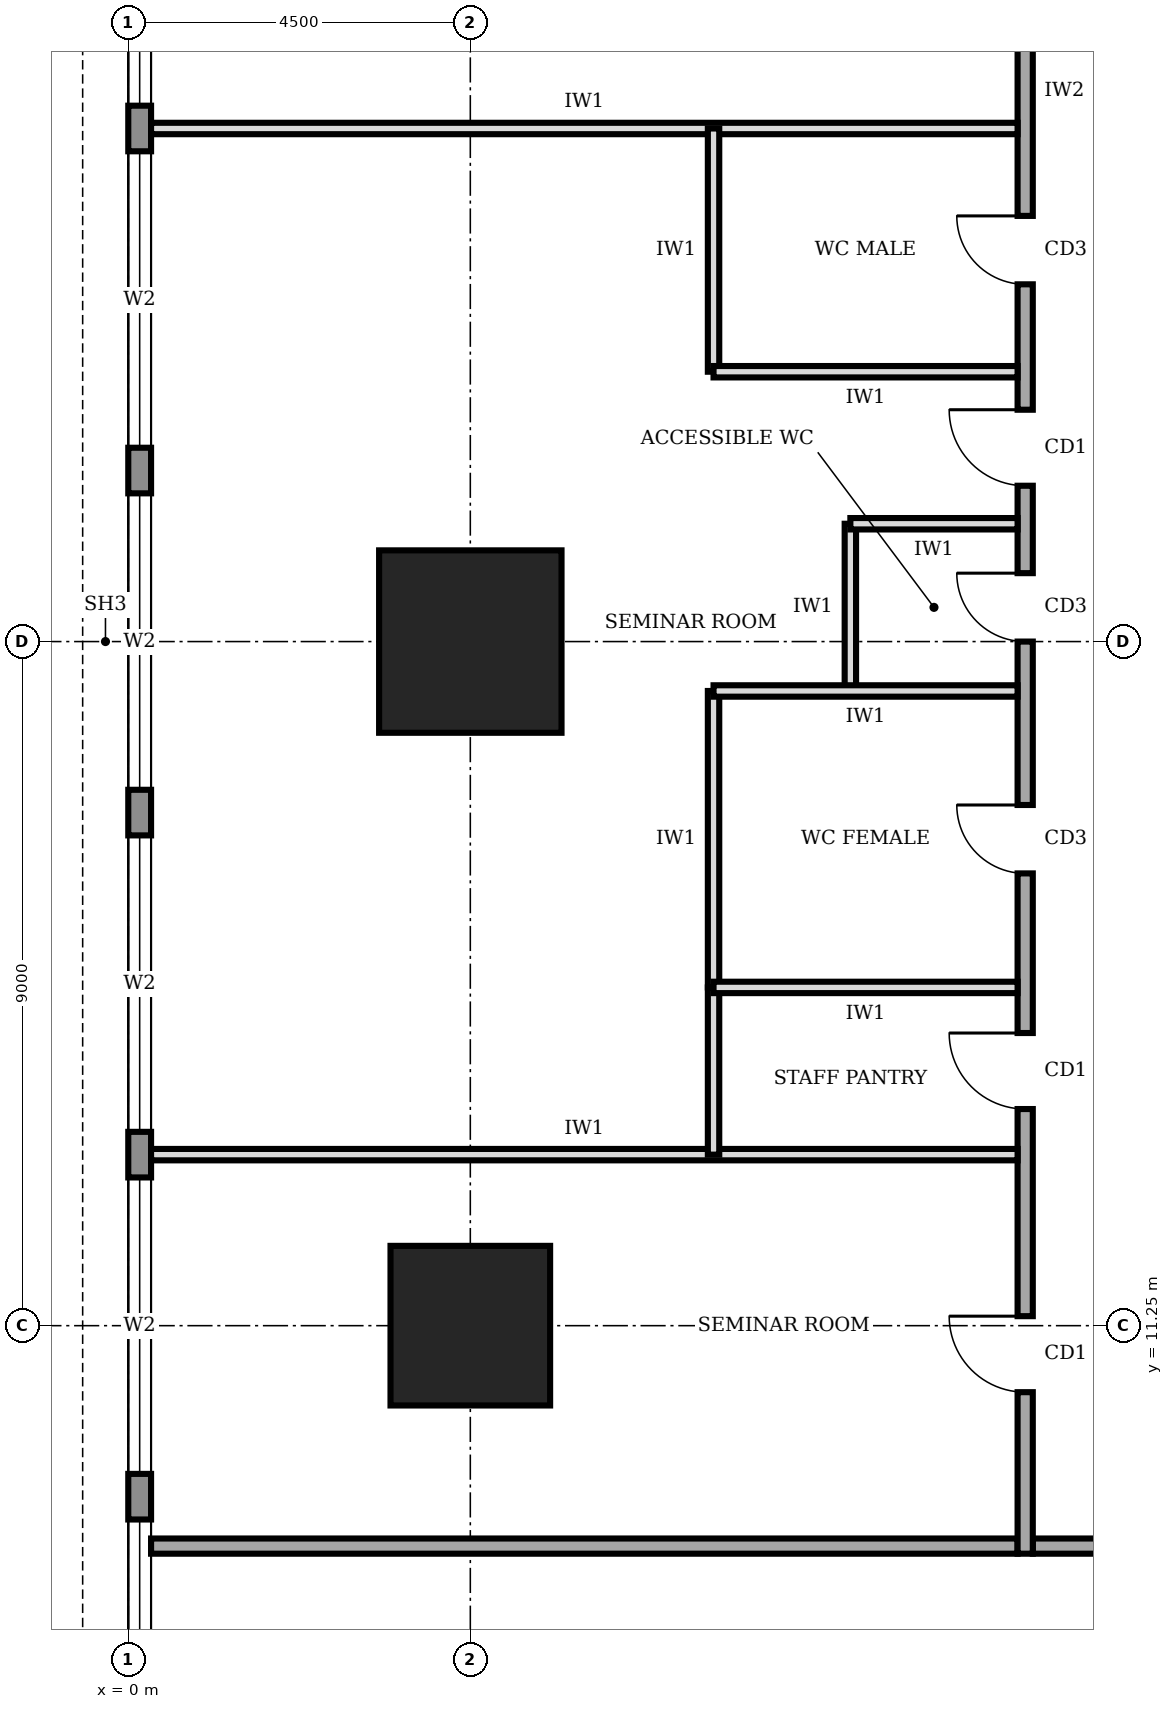
"""IFC4 building model, lengths in metres.
Left out: names, types, materials, properties, quantities, classifications, styles, units other than length and angle.
Written with IfcOpenShell. Run it as: python <this file> out.ifc"""

import sys

from ifc_helpers import new_model, si_unit, direction, frame, frame_2d, origin, origin_2d, place, context, subcontext, project, spatial, rectangle, extrude, element, fill, save


model = new_model("IFC4")
c1 = context("Model", 3, precision=1e-05, world=origin(), true_north=direction((0.0, 1.0)))
c2 = subcontext(c1, "Body", "Model", "MODEL_VIEW")
j1 = project(units=[si_unit("LENGTHUNIT", "METRE"), si_unit("PLANEANGLEUNIT", "RADIAN")], contexts=[c1])
p1 = place(None, origin())
s1 = spatial("IfcSite", under=j1, at=p1, CompositionType="ELEMENT")
p2 = place(p1, origin())
s2 = spatial("IfcBuilding", under=s1, at=p2, CompositionType="ELEMENT")
p3 = place(p2, frame((0.0, 0.0, 161.0)))
s3 = spatial("IfcBuildingStorey", under=s2, at=p3, CompositionType="ELEMENT", Elevation=161.0)
p4 = place(p3, frame((4.5, 11.25, 0.0), z_axis=(0.0, 0.0, 1.0), x_axis=(1.0, 0.0, 0.0)))
e1 = element("IfcColumn", 1, at=p4, inside=s3, PredefinedType="COLUMN", context=c2, shape_type="SweptSolid", body=[
    extrude(rectangle(XDim=2.1, YDim=2.1, at=origin_2d()), origin(), (0.0, 0.0, 1.0), 4.0),
])
p5 = place(p3, frame((4.5, 20.25, 0.0), z_axis=(0.0, 0.0, 1.0), x_axis=(1.0, 0.0, 0.0)))
e2 = element("IfcColumn", 2, at=p5, inside=s3, PredefinedType="COLUMN", context=c2, shape_type="SweptSolid", body=[
    extrude(rectangle(XDim=2.4, YDim=2.4, at=origin_2d()), origin(), (0.0, 0.0, 1.0), 4.0),
])
p6 = place(p3, frame((0.15, 35.98, 0.0), z_axis=(0.0, 0.0, 1.0), x_axis=(0.0, -1.0, 0.0)))
e3 = element("IfcWall", 3, at=p6, inside=s3, PredefinedType="STANDARD", context=c2, shape_type="SweptSolid", body=[
    extrude(rectangle(XDim=31.46, YDim=0.3, at=frame_2d((15.73, 0.0))), origin(), (0.0, 0.0, 1.0), 3.75),
])
p7 = place(p6, frame((27.28, 0.0, 0.6)))
e4 = element("IfcOpeningElement", 4, at=p7, cuts=e3, PredefinedType="OPENING", context=c2, shape_type="SweptSolid", body=[
    extrude(rectangle(XDim=3.9, YDim=2.6, at=frame_2d((1.95, 1.3))), frame((0.0, 0.16, 0.0), z_axis=(0.0, -1.0, 0.0), x_axis=(1.0, 0.0, 0.0)), (0.0, 0.0, 1.0), 0.32),
])
p8 = place(p6, frame((22.78, 0.0, 0.6)))
e5 = element("IfcOpeningElement", 5, at=p8, cuts=e3, PredefinedType="OPENING", context=c2, shape_type="SweptSolid", body=[
    extrude(rectangle(XDim=3.9, YDim=2.6, at=frame_2d((1.95, 1.3))), frame((0.0, 0.16, 0.0), z_axis=(0.0, -1.0, 0.0), x_axis=(1.0, 0.0, 0.0)), (0.0, 0.0, 1.0), 0.32),
])
p9 = place(p6, frame((18.28, 0.0, 0.6)))
e6 = element("IfcOpeningElement", 6, at=p9, cuts=e3, PredefinedType="OPENING", context=c2, shape_type="SweptSolid", body=[
    extrude(rectangle(XDim=3.9, YDim=2.6, at=frame_2d((1.95, 1.3))), frame((0.0, 0.16, 0.0), z_axis=(0.0, -1.0, 0.0), x_axis=(1.0, 0.0, 0.0)), (0.0, 0.0, 1.0), 0.32),
])
p10 = place(p6, frame((13.78, 0.0, 0.6)))
e7 = element("IfcOpeningElement", 7, at=p10, cuts=e3, PredefinedType="OPENING", context=c2, shape_type="SweptSolid", body=[
    extrude(rectangle(XDim=3.9, YDim=2.6, at=frame_2d((1.95, 1.3))), frame((0.0, 0.16, 0.0), z_axis=(0.0, -1.0, 0.0), x_axis=(1.0, 0.0, 0.0)), (0.0, 0.0, 1.0), 0.32),
])
p11 = place(p6, frame((9.28, 0.0, 0.6)))
e8 = element("IfcOpeningElement", 8, at=p11, cuts=e3, PredefinedType="OPENING", context=c2, shape_type="SweptSolid", body=[
    extrude(rectangle(XDim=3.9, YDim=2.6, at=frame_2d((1.95, 1.3))), frame((0.0, 0.16, 0.0), z_axis=(0.0, -1.0, 0.0), x_axis=(1.0, 0.0, 0.0)), (0.0, 0.0, 1.0), 0.32),
])
p12 = place(p6, frame((4.78, 0.0, 0.6)))
e9 = element("IfcOpeningElement", 9, at=p12, cuts=e3, PredefinedType="OPENING", context=c2, shape_type="SweptSolid", body=[
    extrude(rectangle(XDim=3.9, YDim=2.6, at=frame_2d((1.95, 1.3))), frame((0.0, 0.16, 0.0), z_axis=(0.0, -1.0, 0.0), x_axis=(1.0, 0.0, 0.0)), (0.0, 0.0, 1.0), 0.32),
])
p13 = place(p3, frame((11.9, 8.35, 0.0), z_axis=(0.0, 0.0, 1.0), x_axis=(1.0, 0.0, 0.0)))
e10 = element("IfcWall", 10, at=p13, inside=s3, PredefinedType="SOLIDWALL", context=c2, shape_type="SweptSolid", body=[
    extrude(rectangle(XDim=28.3, YDim=0.2, at=frame_2d((14.15, 0.0))), origin(), (0.0, 0.0, 1.0), 3.75),
])
p14 = place(p13, frame((6.55, 0.0, 0.0)))
e11 = element("IfcOpeningElement", 11, at=p14, cuts=e10, PredefinedType="OPENING", context=c2, shape_type="SweptSolid", body=[
    extrude(rectangle(XDim=1.8, YDim=2.1, at=frame_2d((0.9, 1.05))), frame((0.0, 0.11, 0.0), z_axis=(0.0, -1.0, 0.0), x_axis=(1.0, 0.0, 0.0)), (0.0, 0.0, 1.0), 0.22),
])
p15 = place(p13, frame((21.3, 0.0, 0.0)))
e12 = element("IfcOpeningElement", 12, at=p15, cuts=e10, PredefinedType="OPENING", context=c2, shape_type="SweptSolid", body=[
    extrude(rectangle(XDim=1.0, YDim=2.1, at=frame_2d((0.5, 1.05))), frame((0.0, 0.11, 0.0), z_axis=(0.0, -1.0, 0.0), x_axis=(1.0, 0.0, 0.0)), (0.0, 0.0, 1.0), 0.22),
])
p16 = place(p3, frame((11.8, 32.05, 0.0), z_axis=(0.0, 0.0, 1.0), x_axis=(0.0, -1.0, 0.0)))
e13 = element("IfcWall", 13, at=p16, inside=s3, PredefinedType="SOLIDWALL", context=c2, shape_type="SweptSolid", body=[
    extrude(rectangle(XDim=23.8, YDim=0.2, at=frame_2d((11.9, 0.0))), origin(), (0.0, 0.0, 1.0), 3.75),
])
p17 = place(p16, frame((20.675, 0.0, 0.0)))
e14 = element("IfcOpeningElement", 14, at=p17, cuts=e13, PredefinedType="OPENING", context=c2, shape_type="SweptSolid", body=[
    extrude(rectangle(XDim=1.0, YDim=2.1, at=frame_2d((0.5, 1.05))), frame((0.0, 0.11, 0.0), z_axis=(0.0, -1.0, 0.0), x_axis=(1.0, 0.0, 0.0)), (0.0, 0.0, 1.0), 0.22),
])
p18 = place(p16, frame((16.95, 0.0, 0.0)))
e15 = element("IfcOpeningElement", 15, at=p18, cuts=e13, PredefinedType="OPENING", context=c2, shape_type="SweptSolid", body=[
    extrude(rectangle(XDim=1.0, YDim=2.1, at=frame_2d((0.5, 1.05))), frame((0.0, 0.11, 0.0), z_axis=(0.0, -1.0, 0.0), x_axis=(1.0, 0.0, 0.0)), (0.0, 0.0, 1.0), 0.22),
])
p19 = place(p16, frame((13.95, 0.0, 0.0)))
e16 = element("IfcOpeningElement", 16, at=p19, cuts=e13, PredefinedType="OPENING", context=c2, shape_type="SweptSolid", body=[
    extrude(rectangle(XDim=0.9, YDim=2.1, at=frame_2d((0.45, 1.05))), frame((0.0, 0.11, 0.0), z_axis=(0.0, -1.0, 0.0), x_axis=(1.0, 0.0, 0.0)), (0.0, 0.0, 1.0), 0.22),
])
p20 = place(p16, frame((10.9, 0.0, 0.0)))
e17 = element("IfcOpeningElement", 17, at=p20, cuts=e13, PredefinedType="OPENING", context=c2, shape_type="SweptSolid", body=[
    extrude(rectangle(XDim=0.9, YDim=2.1, at=frame_2d((0.45, 1.05))), frame((0.0, 0.11, 0.0), z_axis=(0.0, -1.0, 0.0), x_axis=(1.0, 0.0, 0.0)), (0.0, 0.0, 1.0), 0.22),
])
p21 = place(p16, frame((6.2, 0.0, 0.0)))
e18 = element("IfcOpeningElement", 18, at=p21, cuts=e13, PredefinedType="OPENING", context=c2, shape_type="SweptSolid", body=[
    extrude(rectangle(XDim=0.9, YDim=2.1, at=frame_2d((0.45, 1.05))), frame((0.0, 0.11, 0.0), z_axis=(0.0, -1.0, 0.0), x_axis=(1.0, 0.0, 0.0)), (0.0, 0.0, 1.0), 0.22),
])
p22 = place(p16, frame((8.75, 0.0, 0.0)))
e19 = element("IfcOpeningElement", 19, at=p22, cuts=e13, PredefinedType="OPENING", context=c2, shape_type="SweptSolid", body=[
    extrude(rectangle(XDim=1.0, YDim=2.1, at=frame_2d((0.5, 1.05))), frame((0.0, 0.11, 0.0), z_axis=(0.0, -1.0, 0.0), x_axis=(1.0, 0.0, 0.0)), (0.0, 0.0, 1.0), 0.22),
])
p23 = place(p16, frame((1.925, 0.0, 0.0)))
e20 = element("IfcOpeningElement", 20, at=p23, cuts=e13, PredefinedType="OPENING", context=c2, shape_type="SweptSolid", body=[
    extrude(rectangle(XDim=1.0, YDim=2.1, at=frame_2d((0.5, 1.05))), frame((0.0, 0.11, 0.0), z_axis=(0.0, -1.0, 0.0), x_axis=(1.0, 0.0, 0.0)), (0.0, 0.0, 1.0), 0.22),
])
p24 = place(p3, frame((0.3, 8.35, 0.0), z_axis=(0.0, 0.0, 1.0), x_axis=(1.0, 0.0, 0.0)))
e21 = element("IfcWall", 21, at=p24, inside=s3, PredefinedType="SOLIDWALL", context=c2, shape_type="SweptSolid", body=[
    extrude(rectangle(XDim=11.4, YDim=0.2, at=frame_2d((5.7, 0.0))), origin(), (0.0, 0.0, 1.0), 3.75),
])
for number, where, z_axis, x_axis in (
    (22, (0.3, 13.5, 0.0), (0.0, 0.0, 1.0), (1.0, 0.0, 0.0)),
    (23, (0.3, 27.0, 0.0), (0.0, 0.0, 1.0), (1.0, 0.0, 0.0)),
):
    element("IfcWall", number, at=place(p3, frame(where, z_axis=z_axis, x_axis=x_axis)), inside=s3, PredefinedType="PARTITIONING", context=c2, shape_type="SweptSolid", body=[
        extrude(rectangle(XDim=11.4, YDim=0.15, at=frame_2d((5.7, 0.0))), origin(), (0.0, 0.0, 1.0), 3.75),
    ])
p25 = place(p3, frame((11.7, 15.7, 0.0), z_axis=(0.0, 0.0, 1.0), x_axis=(-1.0, 0.0, 0.0)))
e24 = element("IfcWall", 24, at=p25, inside=s3, PredefinedType="PARTITIONING", context=c2, shape_type="SweptSolid", body=[
    extrude(rectangle(XDim=4.0, YDim=0.15, at=frame_2d((2.0, 0.0))), origin(), (0.0, 0.0, 1.0), 3.75),
])
p26 = place(p3, frame((11.7, 19.6, 0.0), z_axis=(0.0, 0.0, 1.0), x_axis=(-1.0, 0.0, 0.0)))
e25 = element("IfcWall", 25, at=p26, inside=s3, PredefinedType="PARTITIONING", context=c2, shape_type="SweptSolid", body=[
    extrude(rectangle(XDim=4.0, YDim=0.15, at=frame_2d((2.0, 0.0))), origin(), (0.0, 0.0, 1.0), 2.85),
])
p27 = place(p3, frame((11.7, 21.8, 0.0), z_axis=(0.0, 0.0, 1.0), x_axis=(-1.0, 0.0, 0.0)))
e26 = element("IfcWall", 26, at=p27, inside=s3, PredefinedType="PARTITIONING", context=c2, shape_type="SweptSolid", body=[
    extrude(rectangle(XDim=2.2, YDim=0.15, at=frame_2d((1.1, 0.0))), origin(), (0.0, 0.0, 1.0), 3.75),
])
p28 = place(p3, frame((11.7, 23.8, 0.0), z_axis=(0.0, 0.0, 1.0), x_axis=(-1.0, 0.0, 0.0)))
e27 = element("IfcWall", 27, at=p28, inside=s3, PredefinedType="PARTITIONING", context=c2, shape_type="SweptSolid", body=[
    extrude(rectangle(XDim=4.0, YDim=0.15, at=frame_2d((2.0, 0.0))), origin(), (0.0, 0.0, 1.0), 3.75),
])
p29 = place(p3, frame((7.7, 13.5, 0.0), z_axis=(0.0, 0.0, 1.0), x_axis=(0.0, 1.0, 0.0)))
e28 = element("IfcWall", 28, at=p29, inside=s3, PredefinedType="PARTITIONING", context=c2, shape_type="SweptSolid", body=[
    extrude(rectangle(XDim=2.2, YDim=0.15, at=frame_2d((1.1, 0.0))), origin(), (0.0, 0.0, 1.0), 3.75),
])
p30 = place(p3, frame((7.7, 15.7, 0.0), z_axis=(0.0, 0.0, 1.0), x_axis=(0.0, 1.0, 0.0)))
e29 = element("IfcWall", 29, at=p30, inside=s3, PredefinedType="PARTITIONING", context=c2, shape_type="SweptSolid", body=[
    extrude(rectangle(XDim=3.9, YDim=0.15, at=frame_2d((1.95, 0.0))), origin(), (0.0, 0.0, 1.0), 3.75),
])
p31 = place(p3, frame((9.5, 19.6, 0.0), z_axis=(0.0, 0.0, 1.0), x_axis=(0.0, 1.0, 0.0)))
e30 = element("IfcWall", 30, at=p31, inside=s3, PredefinedType="PARTITIONING", context=c2, shape_type="SweptSolid", body=[
    extrude(rectangle(XDim=2.2, YDim=0.15, at=frame_2d((1.1, 0.0))), origin(), (0.0, 0.0, 1.0), 3.75),
])
p32 = place(p3, frame((7.7, 23.8, 0.0), z_axis=(0.0, 0.0, 1.0), x_axis=(0.0, 1.0, 0.0)))
e31 = element("IfcWall", 31, at=p32, inside=s3, PredefinedType="PARTITIONING", context=c2, shape_type="SweptSolid", body=[
    extrude(rectangle(XDim=3.2, YDim=0.15, at=frame_2d((1.6, 0.0))), origin(), (0.0, 0.0, 1.0), 3.75),
])
p33 = place(p7, origin())
e32 = element("IfcWindow", 32, at=p33, inside=s3, PartitioningType="SINGLE_PANEL", PredefinedType="WINDOW", context=c2, shape_type="SweptSolid", body=[
    extrude(rectangle(XDim=3.9, YDim=2.6, at=frame_2d((1.95, 1.3))), frame((0.0, 0.03, 0.0), z_axis=(0.0, -1.0, 0.0), x_axis=(1.0, 0.0, 0.0)), (0.0, 0.0, 1.0), 0.06),
])
fill(e4, e32)
p34 = place(p8, origin())
e33 = element("IfcWindow", 33, at=p34, inside=s3, PartitioningType="SINGLE_PANEL", PredefinedType="WINDOW", context=c2, shape_type="SweptSolid", body=[
    extrude(rectangle(XDim=3.9, YDim=2.6, at=frame_2d((1.95, 1.3))), frame((0.0, 0.03, 0.0), z_axis=(0.0, -1.0, 0.0), x_axis=(1.0, 0.0, 0.0)), (0.0, 0.0, 1.0), 0.06),
])
fill(e5, e33)
p35 = place(p9, origin())
e34 = element("IfcWindow", 34, at=p35, inside=s3, PartitioningType="SINGLE_PANEL", PredefinedType="WINDOW", context=c2, shape_type="SweptSolid", body=[
    extrude(rectangle(XDim=3.9, YDim=2.6, at=frame_2d((1.95, 1.3))), frame((0.0, 0.03, 0.0), z_axis=(0.0, -1.0, 0.0), x_axis=(1.0, 0.0, 0.0)), (0.0, 0.0, 1.0), 0.06),
])
fill(e6, e34)
p36 = place(p10, origin())
e35 = element("IfcWindow", 35, at=p36, inside=s3, PartitioningType="SINGLE_PANEL", PredefinedType="WINDOW", context=c2, shape_type="SweptSolid", body=[
    extrude(rectangle(XDim=3.9, YDim=2.6, at=frame_2d((1.95, 1.3))), frame((0.0, 0.03, 0.0), z_axis=(0.0, -1.0, 0.0), x_axis=(1.0, 0.0, 0.0)), (0.0, 0.0, 1.0), 0.06),
])
fill(e7, e35)
p37 = place(p11, origin())
e36 = element("IfcWindow", 36, at=p37, inside=s3, PartitioningType="SINGLE_PANEL", PredefinedType="WINDOW", context=c2, shape_type="SweptSolid", body=[
    extrude(rectangle(XDim=3.9, YDim=2.6, at=frame_2d((1.95, 1.3))), frame((0.0, 0.03, 0.0), z_axis=(0.0, -1.0, 0.0), x_axis=(1.0, 0.0, 0.0)), (0.0, 0.0, 1.0), 0.06),
])
fill(e8, e36)
p38 = place(p12, origin())
e37 = element("IfcWindow", 37, at=p38, inside=s3, PartitioningType="SINGLE_PANEL", PredefinedType="WINDOW", context=c2, shape_type="SweptSolid", body=[
    extrude(rectangle(XDim=3.9, YDim=2.6, at=frame_2d((1.95, 1.3))), frame((0.0, 0.03, 0.0), z_axis=(0.0, -1.0, 0.0), x_axis=(1.0, 0.0, 0.0)), (0.0, 0.0, 1.0), 0.06),
])
fill(e9, e37)
p39 = place(p17, frame((1.0, 0.0, 0.0), z_axis=(0.0, 0.0, 1.0), x_axis=(-1.0, 0.0, 0.0)))
e38 = element("IfcDoor", 38, at=p39, inside=s3, OperationType="SINGLE_SWING_RIGHT", PredefinedType="DOOR", context=c2, shape_type="SweptSolid", body=[
    extrude(rectangle(XDim=1.0, YDim=2.1, at=frame_2d((0.5, 1.05))), frame((0.0, 0.025, 0.0), z_axis=(0.0, -1.0, 0.0), x_axis=(1.0, 0.0, 0.0)), (0.0, 0.0, 1.0), 0.05),
])
fill(e14, e38)
p40 = place(p18, frame((1.0, 0.0, 0.0), z_axis=(0.0, 0.0, 1.0), x_axis=(-1.0, 0.0, 0.0)))
e39 = element("IfcDoor", 39, at=p40, inside=s3, OperationType="SINGLE_SWING_RIGHT", PredefinedType="DOOR", context=c2, shape_type="SweptSolid", body=[
    extrude(rectangle(XDim=1.0, YDim=2.1, at=frame_2d((0.5, 1.05))), frame((0.0, 0.025, 0.0), z_axis=(0.0, -1.0, 0.0), x_axis=(1.0, 0.0, 0.0)), (0.0, 0.0, 1.0), 0.05),
])
fill(e15, e39)
p41 = place(p19, frame((0.9, 0.0, 0.0), z_axis=(0.0, 0.0, 1.0), x_axis=(-1.0, 0.0, 0.0)))
e40 = element("IfcDoor", 40, at=p41, inside=s3, OperationType="SINGLE_SWING_RIGHT", PredefinedType="DOOR", context=c2, shape_type="SweptSolid", body=[
    extrude(rectangle(XDim=0.9, YDim=2.1, at=frame_2d((0.45, 1.05))), frame((0.0, 0.025, 0.0), z_axis=(0.0, -1.0, 0.0), x_axis=(1.0, 0.0, 0.0)), (0.0, 0.0, 1.0), 0.05),
])
fill(e16, e40)
p42 = place(p20, frame((0.9, 0.0, 0.0), z_axis=(0.0, 0.0, 1.0), x_axis=(-1.0, 0.0, 0.0)))
e41 = element("IfcDoor", 41, at=p42, inside=s3, OperationType="SINGLE_SWING_RIGHT", PredefinedType="DOOR", context=c2, shape_type="SweptSolid", body=[
    extrude(rectangle(XDim=0.9, YDim=2.1, at=frame_2d((0.45, 1.05))), frame((0.0, 0.025, 0.0), z_axis=(0.0, -1.0, 0.0), x_axis=(1.0, 0.0, 0.0)), (0.0, 0.0, 1.0), 0.05),
])
fill(e17, e41)
p43 = place(p21, frame((0.9, 0.0, 0.0), z_axis=(0.0, 0.0, 1.0), x_axis=(-1.0, 0.0, 0.0)))
e42 = element("IfcDoor", 42, at=p43, inside=s3, OperationType="SINGLE_SWING_RIGHT", PredefinedType="DOOR", context=c2, shape_type="SweptSolid", body=[
    extrude(rectangle(XDim=0.9, YDim=2.1, at=frame_2d((0.45, 1.05))), frame((0.0, 0.025, 0.0), z_axis=(0.0, -1.0, 0.0), x_axis=(1.0, 0.0, 0.0)), (0.0, 0.0, 1.0), 0.05),
])
fill(e18, e42)
p44 = place(p22, frame((1.0, 0.0, 0.0), z_axis=(0.0, 0.0, 1.0), x_axis=(-1.0, 0.0, 0.0)))
e43 = element("IfcDoor", 43, at=p44, inside=s3, OperationType="SINGLE_SWING_RIGHT", PredefinedType="DOOR", context=c2, shape_type="SweptSolid", body=[
    extrude(rectangle(XDim=1.0, YDim=2.1, at=frame_2d((0.5, 1.05))), frame((0.0, 0.025, 0.0), z_axis=(0.0, -1.0, 0.0), x_axis=(1.0, 0.0, 0.0)), (0.0, 0.0, 1.0), 0.05),
])
fill(e19, e43)
save(model, sys.argv[1])
